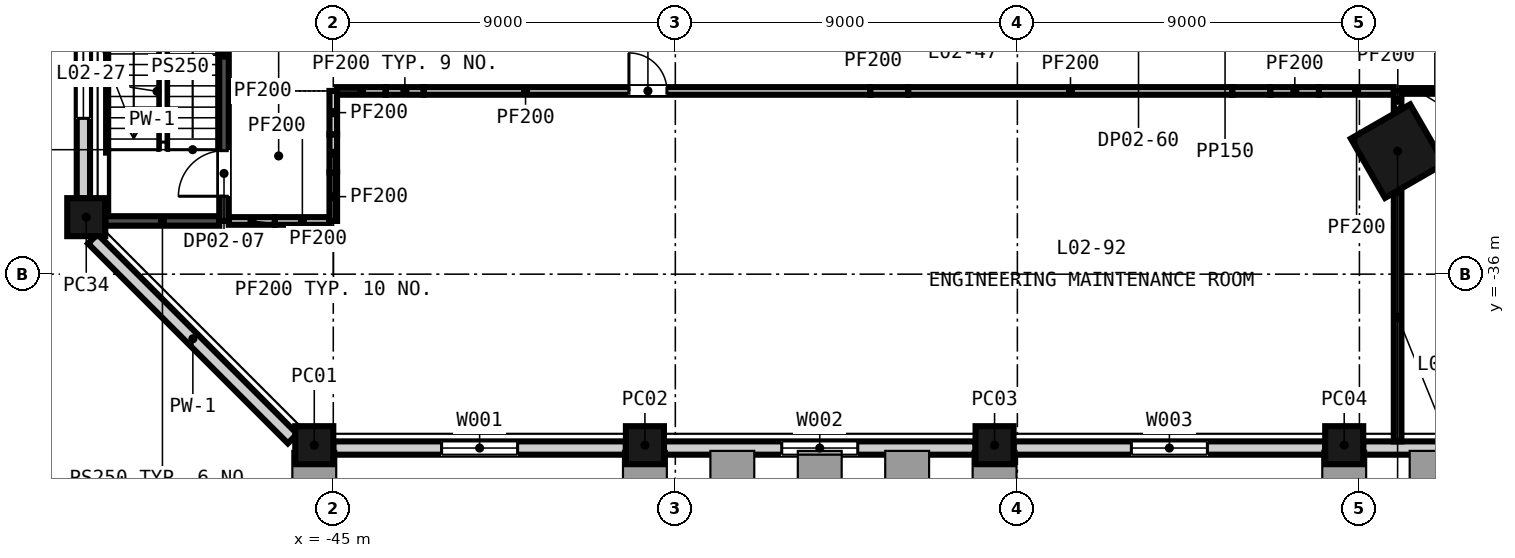
"""IFC4 building model, lengths in metres.
Left out: names, types, materials, properties, quantities, classifications, styles, units other than length and angle.
Written with IfcOpenShell. Run it as: python <this file> out.ifc"""

import sys

from ifc_helpers import new_model, si_unit, direction, frame, frame_2d, origin, origin_2d, place, context, subcontext, project, spatial, rectangle, extrude, element, fill, save


model = new_model("IFC4")
c1 = context("Model", 3, precision=1e-05, world=origin(), true_north=direction((0.0, 1.0)))
c2 = subcontext(c1, "Body", "Model", "MODEL_VIEW")
j1 = project(units=[si_unit("LENGTHUNIT", "METRE"), si_unit("PLANEANGLEUNIT", "RADIAN")], contexts=[c1])
p1 = place(None, origin())
s1 = spatial("IfcSite", under=j1, at=p1, CompositionType="ELEMENT")
p2 = place(p1, origin())
s2 = spatial("IfcBuilding", under=s1, at=p2, CompositionType="ELEMENT")
p3 = place(p2, frame((0.0, 0.0, 18.0)))
s3 = spatial("IfcBuildingStorey", under=s2, at=p3, CompositionType="ELEMENT", Elevation=18.0)
p4 = place(p3, frame((-16.995, -32.763, -0.4), z_axis=(0.0, 0.0, 1.0), x_axis=(0.5, -0.866025403784, 0.0)))
e1 = element("IfcColumn", 1, at=p4, inside=s3, PredefinedType="COLUMN", context=c2, shape_type="SweptSolid", body=[
    extrude(rectangle(XDim=1.8, YDim=1.8, at=origin_2d()), origin(), (0.0, 0.0, 1.0), 4.6),
])
for number, where, z_axis, x_axis in (
    (2, (-45.5, -40.5, -0.4), (0.0, 0.0, 1.0), (1.0, 0.0, 0.0)),
    (3, (-36.8, -40.5, -0.4), (0.0, 0.0, 1.0), (1.0, 0.0, 0.0)),
    (4, (-27.6, -40.5, -0.4), (0.0, 0.0, 1.0), (1.0, 0.0, 0.0)),
    (5, (-18.4, -40.5, -0.4), (0.0, 0.0, 1.0), (1.0, 0.0, 0.0)),
    (6, (-51.5, -34.5, -0.4), (0.0, 0.0, 1.0), (0.0, -1.0, 0.0)),
):
    element("IfcColumn", number, at=place(p3, frame(where, z_axis=z_axis, x_axis=x_axis)), inside=s3, PredefinedType="COLUMN", context=c2, shape_type="SweptSolid", body=[
        extrude(rectangle(XDim=1.0, YDim=1.0, at=origin_2d()), origin(), (0.0, 0.0, 1.0), 4.6),
    ])
p5 = place(p3, frame((-45.0, -40.575, -0.4), z_axis=(0.0, 0.0, 1.0), x_axis=(1.0, 0.0, 0.0)))
e7 = element("IfcWall", 7, at=p5, inside=s3, PredefinedType="SOLIDWALL", context=c2, shape_type="SweptSolid", body=[
    extrude(rectangle(XDim=7.7, YDim=0.35, at=frame_2d((3.85, 0.0))), origin(), (0.0, 0.0, 1.0), 3.7),
])
p6 = place(p5, frame((2.85, 0.0, 1.3)))
e8 = element("IfcOpeningElement", 8, at=p6, cuts=e7, PredefinedType="OPENING", context=c2, shape_type="SweptSolid", body=[
    extrude(rectangle(XDim=2.0, YDim=2.35, at=frame_2d((1.0, 1.175))), frame((0.0, 0.185, 0.0), z_axis=(0.0, -1.0, 0.0), x_axis=(1.0, 0.0, 0.0)), (0.0, 0.0, 1.0), 0.37),
])
p7 = place(p3, frame((-36.3, -40.575, -0.4), z_axis=(0.0, 0.0, 1.0), x_axis=(1.0, 0.0, 0.0)))
e9 = element("IfcWall", 9, at=p7, inside=s3, PredefinedType="SOLIDWALL", context=c2, shape_type="SweptSolid", body=[
    extrude(rectangle(XDim=8.2, YDim=0.35, at=frame_2d((4.1, 0.0))), origin(), (0.0, 0.0, 1.0), 3.7),
])
p8 = place(p7, frame((3.1, 0.0, 1.3)))
e10 = element("IfcOpeningElement", 10, at=p8, cuts=e9, PredefinedType="OPENING", context=c2, shape_type="SweptSolid", body=[
    extrude(rectangle(XDim=2.0, YDim=2.35, at=frame_2d((1.0, 1.175))), frame((0.0, 0.185, 0.0), z_axis=(0.0, -1.0, 0.0), x_axis=(1.0, 0.0, 0.0)), (0.0, 0.0, 1.0), 0.37),
])
p9 = place(p3, frame((-27.1, -40.575, -0.4), z_axis=(0.0, 0.0, 1.0), x_axis=(1.0, 0.0, 0.0)))
e11 = element("IfcWall", 11, at=p9, inside=s3, PredefinedType="SOLIDWALL", context=c2, shape_type="SweptSolid", body=[
    extrude(rectangle(XDim=8.2, YDim=0.35, at=frame_2d((4.1, 0.0))), origin(), (0.0, 0.0, 1.0), 3.7),
])
p10 = place(p9, frame((3.1, 0.0, 1.3)))
e12 = element("IfcOpeningElement", 12, at=p10, cuts=e11, PredefinedType="OPENING", context=c2, shape_type="SweptSolid", body=[
    extrude(rectangle(XDim=2.0, YDim=2.35, at=frame_2d((1.0, 1.175))), frame((0.0, 0.185, 0.0), z_axis=(0.0, -1.0, 0.0), x_axis=(1.0, 0.0, 0.0)), (0.0, 0.0, 1.0), 0.37),
])
p11 = place(p3, frame((-17.9, -40.575, -0.4), z_axis=(0.0, 0.0, 1.0), x_axis=(1.0, 0.0, 0.0)))
e13 = element("IfcWall", 13, at=p11, inside=s3, PredefinedType="SOLIDWALL", context=c2, shape_type="SweptSolid", body=[
    extrude(rectangle(XDim=8.2, YDim=0.35, at=frame_2d((4.1, 0.0))), origin(), (0.0, 0.0, 1.0), 3.7),
])
p12 = place(p11, frame((3.1, 0.0, 1.3)))
e14 = element("IfcOpeningElement", 14, at=p12, cuts=e13, PredefinedType="OPENING", context=c2, shape_type="SweptSolid", body=[
    extrude(rectangle(XDim=2.0, YDim=2.35, at=frame_2d((1.0, 1.175))), frame((0.0, 0.185, 0.0), z_axis=(0.0, -1.0, 0.0), x_axis=(1.0, 0.0, 0.0)), (0.0, 0.0, 1.0), 0.37),
])
p13 = place(p3, frame((-51.575, -27.8, -0.4), z_axis=(0.0, 0.0, 1.0), x_axis=(0.0, -1.0, 0.0)))
e15 = element("IfcWall", 15, at=p13, inside=s3, PredefinedType="SOLIDWALL", context=c2, shape_type="SweptSolid", body=[
    extrude(rectangle(XDim=6.2, YDim=0.35, at=frame_2d((3.1, 0.0))), origin(), (0.0, 0.0, 1.0), 3.7),
])
p14 = place(p13, frame((2.1, 0.0, 1.3)))
e16 = element("IfcOpeningElement", 16, at=p14, cuts=e15, PredefinedType="OPENING", context=c2, shape_type="SweptSolid", body=[
    extrude(rectangle(XDim=2.0, YDim=2.35, at=frame_2d((1.0, 1.175))), frame((0.0, 0.185, 0.0), z_axis=(0.0, -1.0, 0.0), x_axis=(1.0, 0.0, 0.0)), (0.0, 0.0, 1.0), 0.37),
])
p15 = place(p3, frame((-51.327, -35.072, -0.4), z_axis=(0.0, 0.0, 1.0), x_axis=(0.707106781187, -0.707106781187, 0.0)))
e17 = element("IfcWall", 17, at=p15, inside=s3, PredefinedType="SOLIDWALL", context=c2, shape_type="SweptSolid", body=[
    extrude(rectangle(XDim=7.433, YDim=0.35, at=frame_2d((3.716, 0.0))), origin(), (0.0, 0.0, 1.0), 3.7),
])
p16 = place(p3, frame((-51.0, -34.6, 0.0), z_axis=(0.0, 0.0, 1.0), x_axis=(1.0, 0.0, 0.0)))
e18 = element("IfcWall", 18, at=p16, inside=s3, PredefinedType="SHEAR", context=c2, shape_type="SweptSolid", body=[
    extrude(rectangle(XDim=3.0, YDim=0.25, at=frame_2d((1.5, 0.0))), origin(), (0.0, 0.0, 1.0), 4.2),
])
p17 = place(p3, frame((-47.75, -34.6, 0.0), z_axis=(0.0, 0.0, 1.0), x_axis=(1.0, 0.0, 0.0)))
e19 = element("IfcWall", 19, at=p17, inside=s3, PredefinedType="PARTITIONING", context=c2, shape_type="SweptSolid", body=[
    extrude(rectangle(XDim=1.213, YDim=0.2, at=frame_2d((0.607, 0.0))), origin(), (0.0, 0.0, 1.0), 3.219),
])
p18 = place(p3, frame((-46.537, -34.6, 0.0), z_axis=(0.0, 0.0, 1.0), x_axis=(1.0, 0.0, 0.0)))
e20 = element("IfcWall", 20, at=p18, inside=s3, PredefinedType="PARTITIONING", context=c2, shape_type="SweptSolid", body=[
    extrude(rectangle(XDim=1.437, YDim=0.2, at=frame_2d((0.718, 0.0))), origin(), (0.0, 0.0, 1.0), 4.2),
])
p19 = place(p3, frame((-44.9, -31.179, 0.0), z_axis=(0.0, 0.0, 1.0), x_axis=(1.0, 0.0, 0.0)))
e21 = element("IfcWall", 21, at=p19, inside=s3, PredefinedType="PARTITIONING", context=c2, shape_type="SweptSolid", body=[
    extrude(rectangle(XDim=1.279, YDim=0.2, at=frame_2d((0.64, 0.0))), origin(), (0.0, 0.0, 1.0), 4.2),
])
p20 = place(p3, frame((-43.621, -31.179, 0.0), z_axis=(0.0, 0.0, 1.0), x_axis=(1.0, 0.0, 0.0)))
e22 = element("IfcWall", 22, at=p20, inside=s3, PredefinedType="PARTITIONING", context=c2, shape_type="SweptSolid", body=[
    extrude(rectangle(XDim=1.0, YDim=0.2, at=frame_2d((0.5, 0.0))), origin(), (0.0, 0.0, 1.0), 3.219),
])
p21 = place(p3, frame((-42.621, -31.179, 0.0), z_axis=(0.0, 0.0, 1.0), x_axis=(1.0, 0.0, 0.0)))
e23 = element("IfcWall", 23, at=p21, inside=s3, PredefinedType="PARTITIONING", context=c2, shape_type="SweptSolid", body=[
    extrude(rectangle(XDim=11.75, YDim=0.2, at=frame_2d((5.875, 0.0))), origin(), (0.0, 0.0, 1.0), 4.2),
])
p22 = place(p21, frame((5.4, 0.0, 0.0)))
e24 = element("IfcOpeningElement", 24, at=p22, cuts=e23, PredefinedType="OPENING", context=c2, shape_type="SweptSolid", body=[
    extrude(rectangle(XDim=1.0, YDim=2.1, at=frame_2d((0.5, 1.05))), frame((0.0, 0.11, 0.0), z_axis=(0.0, -1.0, 0.0), x_axis=(1.0, 0.0, 0.0)), (0.0, 0.0, 1.0), 0.22),
])
p23 = place(p3, frame((-30.871, -31.179, 0.0), z_axis=(0.0, 0.0, 1.0), x_axis=(1.0, 0.0, 0.0)))
e25 = element("IfcWall", 25, at=p23, inside=s3, PredefinedType="PARTITIONING", context=c2, shape_type="SweptSolid", body=[
    extrude(rectangle(XDim=1.0, YDim=0.2, at=frame_2d((0.5, 0.0))), origin(), (0.0, 0.0, 1.0), 3.219),
])
p24 = place(p3, frame((-29.871, -31.179, 0.0), z_axis=(0.0, 0.0, 1.0), x_axis=(1.0, 0.0, 0.0)))
e26 = element("IfcWall", 26, at=p24, inside=s3, PredefinedType="PARTITIONING", context=c2, shape_type="SweptSolid", body=[
    extrude(rectangle(XDim=8.527, YDim=0.2, at=frame_2d((4.263, 0.0))), origin(), (0.0, 0.0, 1.0), 4.2),
])
p25 = place(p3, frame((-21.344, -31.179, 0.0), z_axis=(0.0, 0.0, 1.0), x_axis=(1.0, 0.0, 0.0)))
e27 = element("IfcWall", 27, at=p25, inside=s3, PredefinedType="PARTITIONING", context=c2, shape_type="SweptSolid", body=[
    extrude(rectangle(XDim=1.0, YDim=0.2, at=frame_2d((0.5, 0.0))), origin(), (0.0, 0.0, 1.0), 3.451),
])
p26 = place(p3, frame((-20.344, -31.179, 0.0), z_axis=(0.0, 0.0, 1.0), x_axis=(1.0, 0.0, 0.0)))
e28 = element("IfcWall", 28, at=p26, inside=s3, PredefinedType="PARTITIONING", context=c2, shape_type="SweptSolid", body=[
    extrude(rectangle(XDim=1.279, YDim=0.2, at=frame_2d((0.64, 0.0))), origin(), (0.0, 0.0, 1.0), 4.2),
])
p27 = place(p3, frame((-19.065, -31.179, 0.0), z_axis=(0.0, 0.0, 1.0), x_axis=(1.0, 0.0, 0.0)))
e29 = element("IfcWall", 29, at=p27, inside=s3, PredefinedType="PARTITIONING", context=c2, shape_type="SweptSolid", body=[
    extrude(rectangle(XDim=1.97, YDim=0.2, at=frame_2d((0.985, 0.0))), origin(), (0.0, 0.0, 1.0), 3.2),
])
p28 = place(p3, frame((-16.895, -31.179, 0.0), z_axis=(0.0, 0.0, 1.0), x_axis=(1.0, 0.0, 0.0)))
e30 = element("IfcWall", 30, at=p28, inside=s3, PredefinedType="PARTITIONING", context=c2, shape_type="SweptSolid", body=[
    extrude(rectangle(XDim=2.663, YDim=0.15, at=frame_2d((1.332, 0.0))), origin(), (0.0, 0.0, 1.0), 4.2),
])
p29 = place(p28, frame((0.9, 0.0, 0.0)))
e31 = element("IfcOpeningElement", 31, at=p29, cuts=e30, PredefinedType="OPENING", context=c2, shape_type="SweptSolid", body=[
    extrude(rectangle(XDim=1.0, YDim=2.1, at=frame_2d((0.5, 1.05))), frame((0.0, 0.085, 0.0), z_axis=(0.0, -1.0, 0.0), x_axis=(1.0, 0.0, 0.0)), (0.0, 0.0, 1.0), 0.17),
])
p30 = place(p3, frame((-47.875, -34.6, 0.0), z_axis=(0.0, 0.0, 1.0), x_axis=(0.0, 1.0, 0.0)))
e32 = element("IfcWall", 32, at=p30, inside=s3, PredefinedType="SHEAR", context=c2, shape_type="SweptSolid", body=[
    extrude(rectangle(XDim=6.821, YDim=0.25, at=frame_2d((3.411, 0.0))), origin(), (0.0, 0.0, 1.0), 4.2),
])
p31 = place(p30, frame((0.65, 0.0, 0.0)))
e33 = element("IfcOpeningElement", 33, at=p31, cuts=e32, PredefinedType="OPENING", context=c2, shape_type="SweptSolid", body=[
    extrude(rectangle(XDim=1.2, YDim=2.1, at=frame_2d((0.6, 1.05))), frame((0.0, 0.135, 0.0), z_axis=(0.0, -1.0, 0.0), x_axis=(1.0, 0.0, 0.0)), (0.0, 0.0, 1.0), 0.27),
])
p32 = place(p3, frame((-45.0, -34.6, 0.0), z_axis=(0.0, 0.0, 1.0), x_axis=(0.0, 1.0, 0.0)))
e34 = element("IfcWall", 34, at=p32, inside=s3, PredefinedType="PARTITIONING", context=c2, shape_type="SweptSolid", body=[
    extrude(rectangle(XDim=1.279, YDim=0.2, at=frame_2d((0.64, 0.0))), origin(), (0.0, 0.0, 1.0), 4.2),
])
p33 = place(p3, frame((-45.0, -33.321, 0.0), z_axis=(0.0, 0.0, 1.0), x_axis=(0.0, 1.0, 0.0)))
e35 = element("IfcWall", 35, at=p33, inside=s3, PredefinedType="PARTITIONING", context=c2, shape_type="SweptSolid", body=[
    extrude(rectangle(XDim=1.0, YDim=0.2, at=frame_2d((0.5, 0.0))), origin(), (0.0, 0.0, 1.0), 3.219),
])
p34 = place(p3, frame((-45.0, -32.321, 0.0), z_axis=(0.0, 0.0, 1.0), x_axis=(0.0, 1.0, 0.0)))
e36 = element("IfcWall", 36, at=p34, inside=s3, PredefinedType="PARTITIONING", context=c2, shape_type="SweptSolid", body=[
    extrude(rectangle(XDim=1.142, YDim=0.2, at=frame_2d((0.571, 0.0))), origin(), (0.0, 0.0, 1.0), 4.2),
])
p35 = place(p3, frame((-16.995, -40.4, 0.0), z_axis=(0.0, 0.0, 1.0), x_axis=(0.0, 1.0, 0.0)))
e37 = element("IfcWall", 37, at=p35, inside=s3, PredefinedType="PARTITIONING", context=c2, shape_type="SweptSolid", body=[
    extrude(rectangle(XDim=6.54, YDim=0.2, at=frame_2d((3.27, 0.0))), origin(), (0.0, 0.0, 1.0), 4.2),
])
p36 = place(p3, frame((-16.995, -31.666, 0.0), z_axis=(0.0, 0.0, 1.0), x_axis=(0.0, 1.0, 0.0)))
e38 = element("IfcWall", 38, at=p36, inside=s3, PredefinedType="PARTITIONING", context=c2, shape_type="SweptSolid", body=[
    extrude(rectangle(XDim=0.487, YDim=0.2, at=frame_2d((0.244, 0.0))), origin(), (0.0, 0.0, 1.0), 4.2),
])
p37 = place(p6, origin())
e39 = element("IfcWindow", 39, at=p37, inside=s3, PartitioningType="SINGLE_PANEL", PredefinedType="WINDOW", context=c2, shape_type="SweptSolid", body=[
    extrude(rectangle(XDim=2.0, YDim=2.35, at=frame_2d((1.0, 1.175))), frame((0.0, 0.03, 0.0), z_axis=(0.0, -1.0, 0.0), x_axis=(1.0, 0.0, 0.0)), (0.0, 0.0, 1.0), 0.06),
])
fill(e8, e39)
p38 = place(p8, origin())
e40 = element("IfcWindow", 40, at=p38, inside=s3, PartitioningType="SINGLE_PANEL", PredefinedType="WINDOW", context=c2, shape_type="SweptSolid", body=[
    extrude(rectangle(XDim=2.0, YDim=2.35, at=frame_2d((1.0, 1.175))), frame((0.0, 0.03, 0.0), z_axis=(0.0, -1.0, 0.0), x_axis=(1.0, 0.0, 0.0)), (0.0, 0.0, 1.0), 0.06),
])
fill(e10, e40)
p39 = place(p10, origin())
e41 = element("IfcWindow", 41, at=p39, inside=s3, PartitioningType="SINGLE_PANEL", PredefinedType="WINDOW", context=c2, shape_type="SweptSolid", body=[
    extrude(rectangle(XDim=2.0, YDim=2.35, at=frame_2d((1.0, 1.175))), frame((0.0, 0.03, 0.0), z_axis=(0.0, -1.0, 0.0), x_axis=(1.0, 0.0, 0.0)), (0.0, 0.0, 1.0), 0.06),
])
fill(e12, e41)
p40 = place(p14, origin())
e42 = element("IfcWindow", 42, at=p40, inside=s3, PartitioningType="SINGLE_PANEL", PredefinedType="WINDOW", context=c2, shape_type="SweptSolid", body=[
    extrude(rectangle(XDim=2.0, YDim=2.35, at=frame_2d((1.0, 1.175))), frame((0.0, 0.03, 0.0), z_axis=(0.0, -1.0, 0.0), x_axis=(1.0, 0.0, 0.0)), (0.0, 0.0, 1.0), 0.06),
])
fill(e16, e42)
p41 = place(p31, origin())
e43 = element("IfcDoor", 43, at=p41, inside=s3, OperationType="SINGLE_SWING_LEFT", PredefinedType="DOOR", context=c2, shape_type="SweptSolid", body=[
    extrude(rectangle(XDim=1.2, YDim=2.1, at=frame_2d((0.6, 1.05))), frame((0.0, 0.025, 0.0), z_axis=(0.0, -1.0, 0.0), x_axis=(1.0, 0.0, 0.0)), (0.0, 0.0, 1.0), 0.05),
])
fill(e33, e43)
p42 = place(p22, origin())
e44 = element("IfcDoor", 44, at=p42, inside=s3, OperationType="SINGLE_SWING_LEFT", PredefinedType="DOOR", context=c2, shape_type="SweptSolid", body=[
    extrude(rectangle(XDim=1.0, YDim=2.1, at=frame_2d((0.5, 1.05))), frame((0.0, 0.025, 0.0), z_axis=(0.0, -1.0, 0.0), x_axis=(1.0, 0.0, 0.0)), (0.0, 0.0, 1.0), 0.05),
])
fill(e24, e44)
save(model, sys.argv[1])
